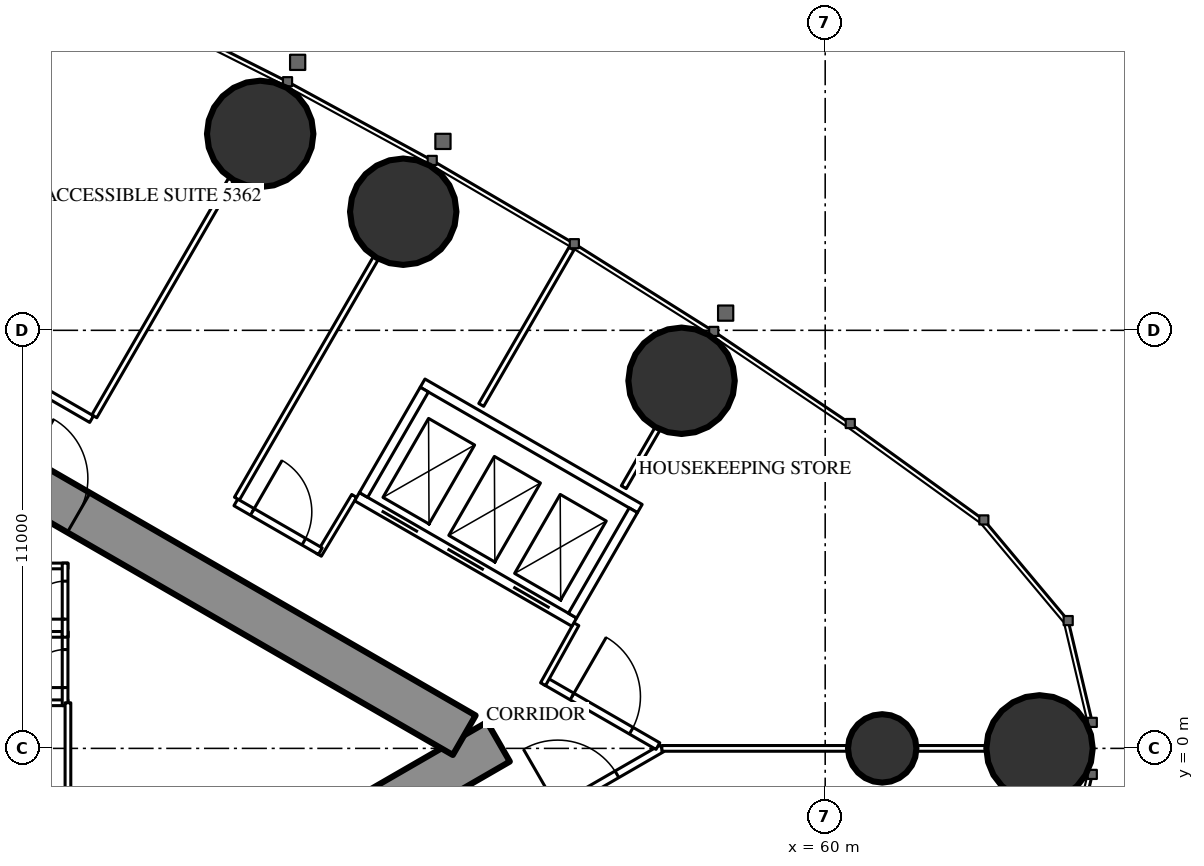
"""IFC4 building model, lengths in metres.
Left out: names, types, materials, properties, quantities, classifications, styles, units other than length and angle.
Written with IfcOpenShell. Run it as: python <this file> out.ifc"""

import sys

from ifc_helpers import new_model, si_unit, direction, frame, frame_2d, origin, origin_2d, place, context, subcontext, project, spatial, rectangle, circle, extrude, element, fill, save


model = new_model("IFC4")
c1 = context("Model", 3, precision=1e-05, world=origin(), true_north=direction((0.0, 1.0)))
c2 = subcontext(c1, "Body", "Model", "MODEL_VIEW")
j1 = project(units=[si_unit("LENGTHUNIT", "METRE"), si_unit("PLANEANGLEUNIT", "RADIAN")], contexts=[c1])
p1 = place(None, origin())
s1 = spatial("IfcSite", under=j1, at=p1, CompositionType="ELEMENT")
p2 = place(p1, origin())
s2 = spatial("IfcBuilding", under=s1, at=p2, CompositionType="ELEMENT")
p3 = place(p2, frame((0.0, 0.0, 198.3)))
s3 = spatial("IfcBuildingStorey", under=s2, at=p3, CompositionType="ELEMENT", Elevation=198.3)
for number, where, z_axis, x_axis in (
    (1, (65.64, 0.0, 0.0), (0.0, 0.0, 1.0), (1.0, 0.0, 0.0)),
    (2, (56.221, 9.672, 0.0), (0.0, 0.0, 1.0), (1.0, 0.0, 0.0)),
    (3, (48.897, 14.121, 0.0), (0.0, 0.0, 1.0), (1.0, 0.0, 0.0)),
    (4, (45.134, 16.168, 0.0), (0.0, 0.0, 1.0), (1.0, 0.0, 0.0)),
):
    element("IfcColumn", number, at=place(p3, frame(where, z_axis=z_axis, x_axis=x_axis)), inside=s3, PredefinedType="COLUMN", context=c2, shape_type="SweptSolid", body=[
        extrude(circle(Radius=1.4, at=origin_2d()), origin(), (0.0, 0.0, 1.0), 3.5),
    ])
p4 = place(p3, frame((61.5, 0.0, 0.0), z_axis=(0.0, 0.0, 1.0), x_axis=(1.0, 0.0, 0.0)))
e5 = element("IfcColumn", 5, at=p4, inside=s3, PredefinedType="COLUMN", context=c2, shape_type="SweptSolid", body=[
    extrude(circle(Radius=0.9, at=origin_2d()), origin(), (0.0, 0.0, 1.0), 3.5),
])
p5 = place(p3, frame((27.2, -13.8, 0.0), z_axis=(0.0, 0.0, 1.0), x_axis=(0.866027159892, 0.499996958321, 0.0)))
e6 = element("IfcWall", 6, at=p5, inside=s3, PredefinedType="SHEAR", context=c2, shape_type="SweptSolid", body=[
    extrude(rectangle(XDim=27.947, YDim=1.2, at=frame_2d((13.973, 0.0))), origin(), (0.0, 0.0, 1.0), 3.5),
])
p6 = place(p5, frame((4.6, 0.0, 0.0)))
e7 = element("IfcOpeningElement", 7, at=p6, cuts=e6, PredefinedType="OPENING", context=c2, shape_type="SweptSolid", body=[
    extrude(rectangle(XDim=1.0, YDim=2.2, at=frame_2d((0.5, 1.1))), frame((0.0, 0.61, 0.0), z_axis=(0.0, -1.0, 0.0), x_axis=(1.0, 0.0, 0.0)), (0.0, 0.0, 1.0), 1.22),
])
p7 = place(p5, frame((13.395, 0.0, 0.0)))
e8 = element("IfcOpeningElement", 8, at=p7, cuts=e6, PredefinedType="OPENING", context=c2, shape_type="SweptSolid", body=[
    extrude(rectangle(XDim=1.8, YDim=2.2, at=frame_2d((0.9, 1.1))), frame((0.0, 0.61, 0.0), z_axis=(0.0, -1.0, 0.0), x_axis=(1.0, 0.0, 0.0)), (0.0, 0.0, 1.0), 1.22),
])
p8 = place(p3, frame((27.2, 13.8, 0.0), z_axis=(0.0, 0.0, 1.0), x_axis=(0.866024515034, -0.500001539357, 0.0)))
e9 = element("IfcWall", 9, at=p8, inside=s3, PredefinedType="SHEAR", context=c2, shape_type="SweptSolid", body=[
    extrude(rectangle(XDim=26.907, YDim=1.2, at=frame_2d((13.454, 0.0))), origin(), (0.0, 0.0, 1.0), 3.5),
])
p9 = place(p8, frame((4.6, 0.0, 0.0)))
e10 = element("IfcOpeningElement", 10, at=p9, cuts=e9, PredefinedType="OPENING", context=c2, shape_type="SweptSolid", body=[
    extrude(rectangle(XDim=1.0, YDim=2.2, at=frame_2d((0.5, 1.1))), frame((0.0, 0.61, 0.0), z_axis=(0.0, -1.0, 0.0), x_axis=(1.0, 0.0, 0.0)), (0.0, 0.0, 1.0), 1.22),
])
p10 = place(p8, frame((13.395, 0.0, 0.0)))
e11 = element("IfcOpeningElement", 11, at=p10, cuts=e9, PredefinedType="OPENING", context=c2, shape_type="SweptSolid", body=[
    extrude(rectangle(XDim=1.8, YDim=2.2, at=frame_2d((0.9, 1.1))), frame((0.0, 0.61, 0.0), z_axis=(0.0, -1.0, 0.0), x_axis=(1.0, 0.0, 0.0)), (0.0, 0.0, 1.0), 1.22),
])
p11 = place(p3, frame((27.959, -16.017, 0.0), z_axis=(0.0, 0.0, 1.0), x_axis=(0.866024151371, 0.500002169237, 0.0)))
e12 = element("IfcWall", 12, at=p11, inside=s3, PredefinedType="PARTITIONING", context=c2, shape_type="SweptSolid", body=[
    extrude(rectangle(XDim=32.034, YDim=0.2, at=frame_2d((16.017, 0.0))), origin(), (0.0, 0.0, 1.0), 3.25),
])
p12 = place(p11, frame((0.6, 0.0, 0.0)))
e13 = element("IfcOpeningElement", 13, at=p12, cuts=e12, PredefinedType="OPENING", context=c2, shape_type="SweptSolid", body=[
    extrude(rectangle(XDim=0.95, YDim=2.2, at=frame_2d((0.475, 1.1))), frame((0.0, 0.11, 0.0), z_axis=(0.0, -1.0, 0.0), x_axis=(1.0, 0.0, 0.0)), (0.0, 0.0, 1.0), 0.22),
])
p13 = place(p11, frame((13.132, 0.0, 0.0)))
e14 = element("IfcOpeningElement", 14, at=p13, cuts=e12, PredefinedType="OPENING", context=c2, shape_type="SweptSolid", body=[
    extrude(rectangle(XDim=0.95, YDim=2.2, at=frame_2d((0.475, 1.1))), frame((0.0, 0.11, 0.0), z_axis=(0.0, -1.0, 0.0), x_axis=(1.0, 0.0, 0.0)), (0.0, 0.0, 1.0), 0.22),
])
p14 = place(p11, frame((15.391, 0.0, 0.0)))
e15 = element("IfcOpeningElement", 15, at=p14, cuts=e12, PredefinedType="OPENING", context=c2, shape_type="SweptSolid", body=[
    extrude(rectangle(XDim=0.95, YDim=2.2, at=frame_2d((0.475, 1.1))), frame((0.0, 0.11, 0.0), z_axis=(0.0, -1.0, 0.0), x_axis=(1.0, 0.0, 0.0)), (0.0, 0.0, 1.0), 0.22),
])
p15 = place(p11, frame((19.441, 0.0, 0.0)))
e16 = element("IfcOpeningElement", 16, at=p15, cuts=e12, PredefinedType="OPENING", context=c2, shape_type="SweptSolid", body=[
    extrude(rectangle(XDim=0.95, YDim=2.2, at=frame_2d((0.475, 1.1))), frame((0.0, 0.11, 0.0), z_axis=(0.0, -1.0, 0.0), x_axis=(1.0, 0.0, 0.0)), (0.0, 0.0, 1.0), 0.22),
])
p16 = place(p11, frame((26.406, 0.0, 0.0)))
e17 = element("IfcOpeningElement", 17, at=p16, cuts=e12, PredefinedType="OPENING", context=c2, shape_type="SweptSolid", body=[
    extrude(rectangle(XDim=0.95, YDim=2.2, at=frame_2d((0.475, 1.1))), frame((0.0, 0.11, 0.0), z_axis=(0.0, -1.0, 0.0), x_axis=(1.0, 0.0, 0.0)), (0.0, 0.0, 1.0), 0.22),
])
p17 = place(p11, frame((28.87, 0.0, 0.0)))
e18 = element("IfcOpeningElement", 18, at=p17, cuts=e12, PredefinedType="OPENING", context=c2, shape_type="SweptSolid", body=[
    extrude(rectangle(XDim=1.8, YDim=2.2, at=frame_2d((0.9, 1.1))), frame((0.0, 0.11, 0.0), z_axis=(0.0, -1.0, 0.0), x_axis=(1.0, 0.0, 0.0)), (0.0, 0.0, 1.0), 0.22),
])
p18 = place(p3, frame((40.769, 8.737, 0.0), z_axis=(0.0, 0.0, 1.0), x_axis=(0.500013115284, 0.866017831539, 0.0)))
e19 = element("IfcWall", 19, at=p18, inside=s3, PredefinedType="PARTITIONING", context=c2, shape_type="SweptSolid", body=[
    extrude(rectangle(XDim=7.198, YDim=0.15, at=frame_2d((3.599, 0.0))), origin(), (0.0, 0.0, 1.0), 2.3),
])
p19 = place(p3, frame((44.521, 6.571, 0.0), z_axis=(0.0, 0.0, 1.0), x_axis=(0.500020376429, 0.866013639128, 0.0)))
e20 = element("IfcWall", 20, at=p19, inside=s3, PredefinedType="PARTITIONING", context=c2, shape_type="SweptSolid", body=[
    extrude(rectangle(XDim=7.306, YDim=0.15, at=frame_2d((3.653, 0.0))), origin(), (0.0, 0.0, 1.0), 2.3),
])
p20 = place(p3, frame((55.702, 0.0, 0.0), z_axis=(0.0, 0.0, 1.0), x_axis=(1.0, 0.0, 0.0)))
e21 = element("IfcWall", 21, at=p20, inside=s3, PredefinedType="PARTITIONING", context=c2, shape_type="SweptSolid", body=[
    extrude(rectangle(XDim=8.518, YDim=0.15, at=frame_2d((4.259, 0.0))), origin(), (0.0, 0.0, 1.0), 2.3),
])
p21 = place(p3, frame((50.95, 9.037, 0.0), z_axis=(0.0, 0.0, 1.0), x_axis=(0.499988022762, 0.866032318735, 0.0)))
e22 = element("IfcWall", 22, at=p21, inside=s3, PredefinedType="PARTITIONING", context=c2, shape_type="SweptSolid", body=[
    extrude(rectangle(XDim=4.748, YDim=0.15, at=frame_2d((2.374, 0.0))), origin(), (0.0, 0.0, 1.0), 3.25),
])
p22 = place(p3, frame((54.7, 6.872, 0.0), z_axis=(0.0, 0.0, 1.0), x_axis=(0.499989690894, 0.866031355668, 0.0)))
e23 = element("IfcWall", 23, at=p22, inside=s3, PredefinedType="PARTITIONING", context=c2, shape_type="SweptSolid", body=[
    extrude(rectangle(XDim=1.766, YDim=0.15, at=frame_2d((0.883, 0.0))), origin(), (0.0, 0.0, 1.0), 3.25),
])
p23 = place(p3, frame((52.639, 1.769, 0.0), z_axis=(0.0, 0.0, 1.0), x_axis=(0.866027340901, -0.4999966448, 0.0)))
e24 = element("IfcWall", 24, at=p23, inside=s3, PredefinedType="PARTITIONING", context=c2, shape_type="SweptSolid", body=[
    extrude(rectangle(XDim=3.417, YDim=0.2, at=frame_2d((1.708, 0.0))), origin(), (0.0, 0.0, 1.0), 3.25),
])
p24 = place(p23, frame((0.809, 0.0, 0.0)))
e25 = element("IfcOpeningElement", 25, at=p24, cuts=e24, PredefinedType="OPENING", context=c2, shape_type="SweptSolid", body=[
    extrude(rectangle(XDim=1.8, YDim=2.2, at=frame_2d((0.9, 1.1))), frame((0.0, 0.11, 0.0), z_axis=(0.0, -1.0, 0.0), x_axis=(1.0, 0.0, 0.0)), (0.0, 0.0, 1.0), 0.22),
])
for number, where, z_axis, x_axis in (
    (26, (52.576, 1.689, 0.0), (0.0, 0.0, 1.0), (0.485, 0.874, 0.0)),
    (27, (47.606, 6.643, 0.0), (0.0, 0.0, 1.0), (-0.514, -0.858, 0.0)),
):
    element("IfcWall", number, at=place(p3, frame(where, z_axis=z_axis, x_axis=x_axis)), inside=s3, PredefinedType="PARTITIONING", context=c2, shape_type="SweptSolid", body=[
        extrude(rectangle(XDim=1.805, YDim=0.15, at=frame_2d((0.902, 0.0))), origin(), (0.0, 0.0, 1.0), 3.25),
    ])
p25 = place(p3, frame((27.959, 16.017, 0.0), z_axis=(0.0, 0.0, 1.0), x_axis=(0.866024165033, -0.500002145574, 0.0)))
e28 = element("IfcWall", 28, at=p25, inside=s3, PredefinedType="PARTITIONING", context=c2, shape_type="SweptSolid", body=[
    extrude(rectangle(XDim=14.709, YDim=0.2, at=frame_2d((7.354, 0.0))), origin(), (0.0, 0.0, 1.0), 3.25),
])
p26 = place(p25, frame((9.215, 0.0, 0.0)))
e29 = element("IfcOpeningElement", 29, at=p26, cuts=e28, PredefinedType="OPENING", context=c2, shape_type="SweptSolid", body=[
    extrude(rectangle(XDim=1.0, YDim=2.2, at=frame_2d((0.5, 1.1))), frame((0.0, 0.11, 0.0), z_axis=(0.0, -1.0, 0.0), x_axis=(1.0, 0.0, 0.0)), (0.0, 0.0, 1.0), 0.22),
])
p27 = place(p25, frame((4.765, 0.0, 0.0)))
e30 = element("IfcOpeningElement", 30, at=p27, cuts=e28, PredefinedType="OPENING", context=c2, shape_type="SweptSolid", body=[
    extrude(rectangle(XDim=0.95, YDim=2.2, at=frame_2d((0.475, 1.1))), frame((0.0, 0.11, 0.0), z_axis=(0.0, -1.0, 0.0), x_axis=(1.0, 0.0, 0.0)), (0.0, 0.0, 1.0), 0.22),
])
p28 = place(p3, frame((44.493, 6.472, 0.0), z_axis=(0.0, 0.0, 1.0), x_axis=(0.866027140358, -0.499996992154, 0.0)))
e31 = element("IfcWall", 31, at=p28, inside=s3, PredefinedType="PARTITIONING", context=c2, shape_type="SweptSolid", body=[
    extrude(rectangle(XDim=2.566, YDim=0.2, at=frame_2d((1.283, 0.0))), origin(), (0.0, 0.0, 1.0), 3.25),
])
p29 = place(p28, frame((0.5, 0.0, 0.0)))
e32 = element("IfcOpeningElement", 32, at=p29, cuts=e31, PredefinedType="OPENING", context=c2, shape_type="SweptSolid", body=[
    extrude(rectangle(XDim=1.566, YDim=2.2, at=frame_2d((0.783, 1.1))), frame((0.0, 0.11, 0.0), z_axis=(0.0, -1.0, 0.0), x_axis=(1.0, 0.0, 0.0)), (0.0, 0.0, 1.0), 0.22),
])
for number, where, z_axis, x_axis in (
    (33, (37.9, 1.2, 0.0), (0.0, 0.0, 1.0), (1.0, 0.0, 0.0)),
    (34, (37.9, 3.0, 0.0), (0.0, 0.0, 1.0), (1.0, 0.0, 0.0)),
    (35, (37.9, 4.8, 0.0), (0.0, 0.0, 1.0), (1.0, 0.0, 0.0)),
):
    element("IfcWall", number, at=place(p3, frame(where, z_axis=z_axis, x_axis=x_axis)), inside=s3, PredefinedType="PARTITIONING", context=c2, shape_type="SweptSolid", body=[
        extrude(rectangle(XDim=2.175, YDim=0.15, at=frame_2d((1.087, 0.0))), origin(), (0.0, 0.0, 1.0), 3.25),
    ])
p30 = place(p3, frame((40.0, 1.125, 0.0), z_axis=(0.0, 0.0, 1.0), x_axis=(0.0, 1.0, 0.0)))
e36 = element("IfcWall", 36, at=p30, inside=s3, PredefinedType="PARTITIONING", context=c2, shape_type="SweptSolid", body=[
    extrude(rectangle(XDim=1.95, YDim=0.15, at=frame_2d((0.975, 0.0))), origin(), (0.0, 0.0, 1.0), 3.25),
])
p31 = place(p30, frame((0.475, 0.0, 0.0)))
e37 = element("IfcOpeningElement", 37, at=p31, cuts=e36, PredefinedType="OPENING", context=c2, shape_type="SweptSolid", body=[
    extrude(rectangle(XDim=1.0, YDim=2.2, at=frame_2d((0.5, 1.1))), frame((0.0, 0.085, 0.0), z_axis=(0.0, -1.0, 0.0), x_axis=(1.0, 0.0, 0.0)), (0.0, 0.0, 1.0), 0.17),
])
p32 = place(p3, frame((40.0, 2.925, 0.0), z_axis=(0.0, 0.0, 1.0), x_axis=(0.0, 1.0, 0.0)))
e38 = element("IfcWall", 38, at=p32, inside=s3, PredefinedType="PARTITIONING", context=c2, shape_type="SweptSolid", body=[
    extrude(rectangle(XDim=1.95, YDim=0.15, at=frame_2d((0.975, 0.0))), origin(), (0.0, 0.0, 1.0), 3.25),
])
p33 = place(p32, frame((0.475, 0.0, 0.0)))
e39 = element("IfcOpeningElement", 39, at=p33, cuts=e38, PredefinedType="OPENING", context=c2, shape_type="SweptSolid", body=[
    extrude(rectangle(XDim=1.0, YDim=2.2, at=frame_2d((0.5, 1.1))), frame((0.0, 0.085, 0.0), z_axis=(0.0, -1.0, 0.0), x_axis=(1.0, 0.0, 0.0)), (0.0, 0.0, 1.0), 0.17),
])
p34 = place(p3, frame((40.075, -5.674, 0.0), z_axis=(0.0, 0.0, 1.0), x_axis=(0.0, 1.0, 0.0)))
e40 = element("IfcWall", 40, at=p34, inside=s3, PredefinedType="PARTITIONING", context=c2, shape_type="SweptSolid", body=[
    extrude(rectangle(XDim=6.874, YDim=0.15, at=frame_2d((3.437, 0.0))), origin(), (0.0, 0.0, 1.0), 3.25),
])
p35 = place(p34, frame((2.537, 0.0, 0.0)))
e41 = element("IfcOpeningElement", 41, at=p35, cuts=e40, PredefinedType="OPENING", context=c2, shape_type="SweptSolid", body=[
    extrude(rectangle(XDim=1.8, YDim=2.2, at=frame_2d((0.9, 1.1))), frame((0.0, 0.085, 0.0), z_axis=(0.0, -1.0, 0.0), x_axis=(1.0, 0.0, 0.0)), (0.0, 0.0, 1.0), 0.17),
])
p36 = place(p3, frame((47.681, 6.622, 0.0), z_axis=(0.0, 0.0, 1.0), x_axis=(0.86603344179, -0.499986077507, 0.0)))
e42 = element("IfcWall", 42, at=p36, inside=s3, PredefinedType="PARTITIONING", context=c2, shape_type="SweptSolid", body=[
    extrude(rectangle(XDim=6.6, YDim=0.25, at=frame_2d((3.3, 0.0))), origin(), (0.0, 0.0, 1.0), 3.25),
])
p37 = place(p36, frame((0.75, 0.0, 0.0)))
e43 = element("IfcOpeningElement", 43, at=p37, cuts=e42, PredefinedType="OPENING", context=c2, shape_type="SweptSolid", body=[
    extrude(rectangle(XDim=1.1, YDim=2.2, at=frame_2d((0.55, 1.1))), frame((0.0, 0.135, 0.0), z_axis=(0.0, -1.0, 0.0), x_axis=(1.0, 0.0, 0.0)), (0.0, 0.0, 1.0), 0.27),
])
p38 = place(p36, frame((2.75, 0.0, 0.0)))
e44 = element("IfcOpeningElement", 44, at=p38, cuts=e42, PredefinedType="OPENING", context=c2, shape_type="SweptSolid", body=[
    extrude(rectangle(XDim=1.1, YDim=2.2, at=frame_2d((0.55, 1.1))), frame((0.0, 0.135, 0.0), z_axis=(0.0, -1.0, 0.0), x_axis=(1.0, 0.0, 0.0)), (0.0, 0.0, 1.0), 0.27),
])
p39 = place(p36, frame((4.75, 0.0, 0.0)))
e45 = element("IfcOpeningElement", 45, at=p39, cuts=e42, PredefinedType="OPENING", context=c2, shape_type="SweptSolid", body=[
    extrude(rectangle(XDim=1.1, YDim=2.2, at=frame_2d((0.55, 1.1))), frame((0.0, 0.135, 0.0), z_axis=(0.0, -1.0, 0.0), x_axis=(1.0, 0.0, 0.0)), (0.0, 0.0, 1.0), 0.27),
])
p40 = place(p3, frame((49.406, 9.611, 0.0), z_axis=(0.0, 0.0, 1.0), x_axis=(0.86603344179, -0.499986077507, 0.0)))
e46 = element("IfcWall", 46, at=p40, inside=s3, PredefinedType="PARTITIONING", context=c2, shape_type="SweptSolid", body=[
    extrude(rectangle(XDim=6.6, YDim=0.25, at=frame_2d((3.3, 0.0))), origin(), (0.0, 0.0, 1.0), 3.25),
])
p41 = place(p3, frame((47.852, 6.668, 0.0), z_axis=(0.0, 0.0, 1.0), x_axis=(0.499929347863, 0.866066190972, 0.0)))
e47 = element("IfcWall", 47, at=p41, inside=s3, PredefinedType="PARTITIONING", context=c2, shape_type="SweptSolid", body=[
    extrude(rectangle(XDim=3.201, YDim=0.25, at=frame_2d((1.6, 0.0))), origin(), (0.0, 0.0, 1.0), 3.25),
])
p42 = place(p3, frame((53.352, 3.493, 0.0), z_axis=(0.0, 0.0, 1.0), x_axis=(0.499872130319, 0.866099216793, 0.0)))
e48 = element("IfcWall", 48, at=p42, inside=s3, PredefinedType="PARTITIONING", context=c2, shape_type="SweptSolid", body=[
    extrude(rectangle(XDim=3.2, YDim=0.25, at=frame_2d((1.6, 0.0))), origin(), (0.0, 0.0, 1.0), 3.25),
])
p43 = place(p17, origin())
e49 = element("IfcDoor", 49, at=p43, inside=s3, OperationType="DOUBLE_DOOR_SINGLE_SWING", PredefinedType="DOOR", context=c2, shape_type="SweptSolid", body=[
    extrude(rectangle(XDim=1.8, YDim=2.2, at=frame_2d((0.9, 1.1))), frame((0.0, 0.025, 0.0), z_axis=(0.0, -1.0, 0.0), x_axis=(1.0, 0.0, 0.0)), (0.0, 0.0, 1.0), 0.05),
])
fill(e18, e49)
p44 = place(p24, origin())
e50 = element("IfcDoor", 50, at=p44, inside=s3, OperationType="DOUBLE_DOOR_SINGLE_SWING", PredefinedType="DOOR", context=c2, shape_type="SweptSolid", body=[
    extrude(rectangle(XDim=1.8, YDim=2.2, at=frame_2d((0.9, 1.1))), frame((0.0, 0.025, 0.0), z_axis=(0.0, -1.0, 0.0), x_axis=(1.0, 0.0, 0.0)), (0.0, 0.0, 1.0), 0.05),
])
fill(e25, e50)
p45 = place(p29, origin())
e51 = element("IfcDoor", 51, at=p45, inside=s3, OperationType="SINGLE_SWING_LEFT", PredefinedType="DOOR", context=c2, shape_type="SweptSolid", body=[
    extrude(rectangle(XDim=1.566, YDim=2.2, at=frame_2d((0.783, 1.1))), frame((0.0, 0.025, 0.0), z_axis=(0.0, -1.0, 0.0), x_axis=(1.0, 0.0, 0.0)), (0.0, 0.0, 1.0), 0.05),
])
fill(e32, e51)
p46 = place(p31, origin())
e52 = element("IfcDoor", 52, at=p46, inside=s3, OperationType="SINGLE_SWING_LEFT", PredefinedType="DOOR", context=c2, shape_type="SweptSolid", body=[
    extrude(rectangle(XDim=1.0, YDim=2.2, at=frame_2d((0.5, 1.1))), frame((0.0, 0.025, 0.0), z_axis=(0.0, -1.0, 0.0), x_axis=(1.0, 0.0, 0.0)), (0.0, 0.0, 1.0), 0.05),
])
fill(e37, e52)
p47 = place(p33, origin())
e53 = element("IfcDoor", 53, at=p47, inside=s3, OperationType="SINGLE_SWING_LEFT", PredefinedType="DOOR", context=c2, shape_type="SweptSolid", body=[
    extrude(rectangle(XDim=1.0, YDim=2.2, at=frame_2d((0.5, 1.1))), frame((0.0, 0.025, 0.0), z_axis=(0.0, -1.0, 0.0), x_axis=(1.0, 0.0, 0.0)), (0.0, 0.0, 1.0), 0.05),
])
fill(e39, e53)
p48 = place(p10, origin())
e54 = element("IfcDoor", 54, at=p48, inside=s3, OperationType="DOUBLE_DOOR_SINGLE_SWING", PredefinedType="DOOR", context=c2, shape_type="SweptSolid", body=[
    extrude(rectangle(XDim=1.8, YDim=2.2, at=frame_2d((0.9, 1.1))), frame((0.0, 0.025, 0.0), z_axis=(0.0, -1.0, 0.0), x_axis=(1.0, 0.0, 0.0)), (0.0, 0.0, 1.0), 0.05),
])
fill(e11, e54)
p49 = place(p37, origin())
e55 = element("IfcDoor", 55, at=p49, inside=s3, OperationType="DOUBLE_DOOR_SLIDING", PredefinedType="USERDEFINED", context=c2, shape_type="SweptSolid", body=[
    extrude(rectangle(XDim=1.1, YDim=2.2, at=frame_2d((0.55, 1.1))), frame((0.0, 0.025, 0.0), z_axis=(0.0, -1.0, 0.0), x_axis=(1.0, 0.0, 0.0)), (0.0, 0.0, 1.0), 0.05),
])
fill(e43, e55)
p50 = place(p38, origin())
e56 = element("IfcDoor", 56, at=p50, inside=s3, OperationType="DOUBLE_DOOR_SLIDING", PredefinedType="USERDEFINED", context=c2, shape_type="SweptSolid", body=[
    extrude(rectangle(XDim=1.1, YDim=2.2, at=frame_2d((0.55, 1.1))), frame((0.0, 0.025, 0.0), z_axis=(0.0, -1.0, 0.0), x_axis=(1.0, 0.0, 0.0)), (0.0, 0.0, 1.0), 0.05),
])
fill(e44, e56)
p51 = place(p39, origin())
e57 = element("IfcDoor", 57, at=p51, inside=s3, OperationType="DOUBLE_DOOR_SLIDING", PredefinedType="USERDEFINED", context=c2, shape_type="SweptSolid", body=[
    extrude(rectangle(XDim=1.1, YDim=2.2, at=frame_2d((0.55, 1.1))), frame((0.0, 0.025, 0.0), z_axis=(0.0, -1.0, 0.0), x_axis=(1.0, 0.0, 0.0)), (0.0, 0.0, 1.0), 0.05),
])
fill(e45, e57)
save(model, sys.argv[1])
